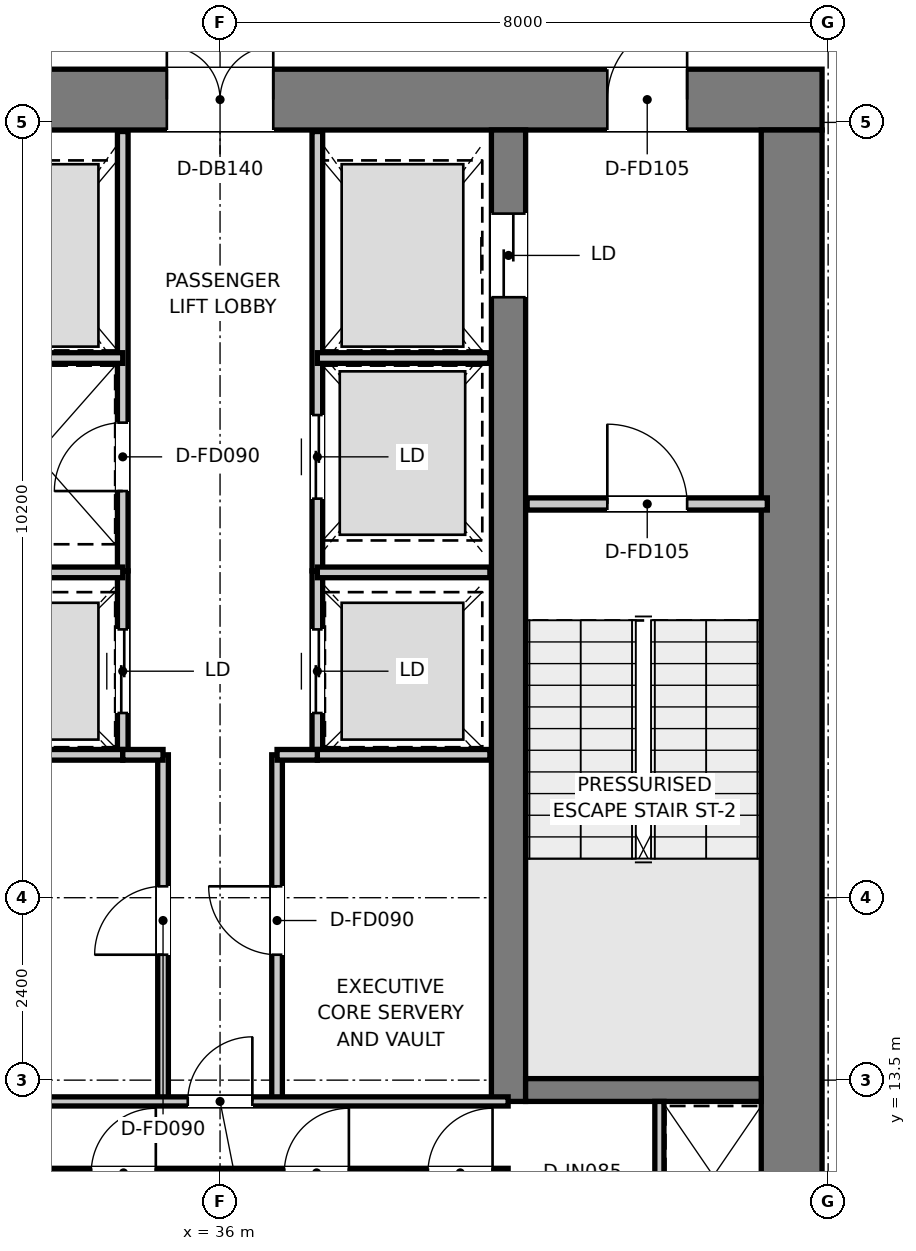
"""IFC4 building model, lengths in metres.
Left out: names, types, materials, properties, quantities, classifications, styles, units other than length and angle.
Written with IfcOpenShell. Run it as: python <this file> out.ifc"""

import sys

from ifc_helpers import new_model, si_unit, direction, frame, frame_2d, origin, place, context, subcontext, project, spatial, rectangle, extrude, element, fill, save


model = new_model("IFC4")
c1 = context("Model", 3, precision=1e-05, world=origin(), true_north=direction((0.0, 1.0)))
c2 = subcontext(c1, "Body", "Model", "MODEL_VIEW")
j1 = project(units=[si_unit("LENGTHUNIT", "METRE"), si_unit("PLANEANGLEUNIT", "RADIAN")], contexts=[c1])
p1 = place(None, origin())
s1 = spatial("IfcSite", under=j1, at=p1, CompositionType="ELEMENT")
p2 = place(p1, origin())
s2 = spatial("IfcBuilding", under=s1, at=p2, CompositionType="ELEMENT")
p3 = place(p2, frame((0.0, 0.0, 314.8)))
s3 = spatial("IfcBuildingStorey", under=s2, at=p3, CompositionType="ELEMENT", Elevation=314.8)
p4 = place(p3, frame((28.08, 26.4, 0.0), z_axis=(0.0, 0.0, 1.0), x_axis=(1.0, 0.0, 0.0)))
e1 = element("IfcWall", 1, at=p4, inside=s3, PredefinedType="SHEAR", context=c2, shape_type="SweptSolid", body=[
    extrude(rectangle(XDim=15.84, YDim=0.8, at=frame_2d((7.92, 0.0))), origin(), (0.0, 0.0, 1.0), 3.95),
])
p5 = place(p4, frame((7.22, 0.0, 0.0)))
e2 = element("IfcOpeningElement", 2, at=p5, cuts=e1, PredefinedType="OPENING", context=c2, shape_type="SweptSolid", body=[
    extrude(rectangle(XDim=1.4, YDim=2.2, at=frame_2d((0.7, 1.1))), frame((0.0, 0.41, 0.0), z_axis=(0.0, -1.0, 0.0), x_axis=(1.0, 0.0, 0.0)), (0.0, 0.0, 1.0), 0.82),
])
p6 = place(p4, frame((1.775, 0.0, 0.0)))
e3 = element("IfcOpeningElement", 3, at=p6, cuts=e1, PredefinedType="OPENING", context=c2, shape_type="SweptSolid", body=[
    extrude(rectangle(XDim=1.05, YDim=2.1, at=frame_2d((0.525, 1.05))), frame((0.0, 0.41, 0.0), z_axis=(0.0, -1.0, 0.0), x_axis=(1.0, 0.0, 0.0)), (0.0, 0.0, 1.0), 0.82),
])
p7 = place(p4, frame((13.015, 0.0, 0.0)))
e4 = element("IfcOpeningElement", 4, at=p7, cuts=e1, PredefinedType="OPENING", context=c2, shape_type="SweptSolid", body=[
    extrude(rectangle(XDim=1.05, YDim=2.1, at=frame_2d((0.525, 1.05))), frame((0.0, 0.41, 0.0), z_axis=(0.0, -1.0, 0.0), x_axis=(1.0, 0.0, 0.0)), (0.0, 0.0, 1.0), 0.82),
])
p8 = place(p3, frame((43.52, 11.3, 0.0), z_axis=(0.0, 0.0, 1.0), x_axis=(0.0, 1.0, 0.0)))
e5 = element("IfcWall", 5, at=p8, inside=s3, PredefinedType="SHEAR", context=c2, shape_type="SweptSolid", body=[
    extrude(rectangle(XDim=14.7, YDim=0.8, at=frame_2d((7.35, 0.0))), origin(), (0.0, 0.0, 1.0), 3.95),
])
p9 = place(p3, frame((39.795, 13.22, 0.0), z_axis=(0.0, 0.0, 1.0), x_axis=(0.0, 1.0, 0.0)))
e6 = element("IfcWall", 6, at=p9, inside=s3, PredefinedType="SHEAR", context=c2, shape_type="SweptSolid", body=[
    extrude(rectangle(XDim=12.78, YDim=0.45, at=frame_2d((6.39, 0.0))), origin(), (0.0, 0.0, 1.0), 3.95),
])
p10 = place(p9, frame((10.58, 0.0, 0.0)))
e7 = element("IfcOpeningElement", 7, at=p10, cuts=e6, PredefinedType="OPENING", context=c2, shape_type="SweptSolid", body=[
    extrude(rectangle(XDim=1.1, YDim=2.15, at=frame_2d((0.55, 1.075))), frame((0.0, 0.235, 0.0), z_axis=(0.0, -1.0, 0.0), x_axis=(1.0, 0.0, 0.0)), (0.0, 0.0, 1.0), 0.47),
])
p11 = place(p3, frame((40.02, 13.37, 0.0), z_axis=(0.0, 0.0, 1.0), x_axis=(1.0, 0.0, 0.0)))
e8 = element("IfcWall", 8, at=p11, inside=s3, PredefinedType="SHEAR", context=c2, shape_type="SweptSolid", body=[
    extrude(rectangle(XDim=3.1, YDim=0.3, at=frame_2d((1.55, 0.0))), origin(), (0.0, 0.0, 1.0), 3.95),
])
p12 = place(p3, frame((40.04, 21.08, 0.0), z_axis=(0.0, 0.0, 1.0), x_axis=(1.0, 0.0, 0.0)))
e9 = element("IfcWall", 9, at=p12, inside=s3, PredefinedType="PARTITIONING", context=c2, shape_type="SweptSolid", body=[
    extrude(rectangle(XDim=3.16, YDim=0.16, at=frame_2d((1.58, 0.0))), origin(), (0.0, 0.0, 1.0), 3.59),
])
p13 = place(p12, frame((1.055, 0.0, 0.0)))
e10 = element("IfcOpeningElement", 10, at=p13, cuts=e9, PredefinedType="OPENING", context=c2, shape_type="SweptSolid", body=[
    extrude(rectangle(XDim=1.05, YDim=2.1, at=frame_2d((0.525, 1.05))), frame((0.0, 0.09, 0.0), z_axis=(0.0, -1.0, 0.0), x_axis=(1.0, 0.0, 0.0)), (0.0, 0.0, 1.0), 0.18),
])
p14 = place(p3, frame((34.72, 20.2, 0.0), z_axis=(0.0, 0.0, 1.0), x_axis=(0.0, 1.0, 0.0)))
e11 = element("IfcWall", 11, at=p14, inside=s3, PredefinedType="PARTITIONING", context=c2, shape_type="SweptSolid", body=[
    extrude(rectangle(XDim=5.78, YDim=0.14, at=frame_2d((2.89, 0.0))), origin(), (0.0, 0.0, 1.0), 2.74),
])
p15 = place(p14, frame((1.05, 0.0, 0.0)))
e12 = element("IfcOpeningElement", 12, at=p15, cuts=e11, PredefinedType="OPENING", context=c2, shape_type="SweptSolid", body=[
    extrude(rectangle(XDim=0.9, YDim=2.1, at=frame_2d((0.45, 1.05))), frame((0.0, 0.08, 0.0), z_axis=(0.0, -1.0, 0.0), x_axis=(1.0, 0.0, 0.0)), (0.0, 0.0, 1.0), 0.16),
])
p16 = place(p3, frame((37.28, 20.2, 0.0), z_axis=(0.0, 0.0, 1.0), x_axis=(0.0, 1.0, 0.0)))
e13 = element("IfcWall", 13, at=p16, inside=s3, PredefinedType="PARTITIONING", context=c2, shape_type="SweptSolid", body=[
    extrude(rectangle(XDim=5.78, YDim=0.14, at=frame_2d((2.89, 0.0))), origin(), (0.0, 0.0, 1.0), 2.74),
])
p17 = place(p16, frame((0.95, 0.0, 0.0)))
e14 = element("IfcOpeningElement", 14, at=p17, cuts=e13, PredefinedType="OPENING", context=c2, shape_type="SweptSolid", body=[
    extrude(rectangle(XDim=1.1, YDim=2.15, at=frame_2d((0.55, 1.075))), frame((0.0, 0.08, 0.0), z_axis=(0.0, -1.0, 0.0), x_axis=(1.0, 0.0, 0.0)), (0.0, 0.0, 1.0), 0.16),
])
for number, where, z_axis, x_axis in (
    (15, (32.45, 23.0, 0.0), (0.0, 0.0, 1.0), (1.0, 0.0, 0.0)),
    (16, (37.28, 23.0, 0.0), (0.0, 0.0, 1.0), (1.0, 0.0, 0.0)),
):
    element("IfcWall", number, at=place(p3, frame(where, z_axis=z_axis, x_axis=x_axis)), inside=s3, PredefinedType="PARTITIONING", context=c2, shape_type="SweptSolid", body=[
        extrude(rectangle(XDim=2.27, YDim=0.14, at=frame_2d((1.135, 0.0))), origin(), (0.0, 0.0, 1.0), 2.74),
    ])
p18 = place(p3, frame((34.72, 17.78, 0.0), z_axis=(0.0, 0.0, 1.0), x_axis=(0.0, 1.0, 0.0)))
e17 = element("IfcWall", 17, at=p18, inside=s3, PredefinedType="PARTITIONING", context=c2, shape_type="SweptSolid", body=[
    extrude(rectangle(XDim=2.42, YDim=0.14, at=frame_2d((1.21, 0.0))), origin(), (0.0, 0.0, 1.0), 3.59),
])
p19 = place(p18, frame((0.55, 0.0, 0.0)))
e18 = element("IfcOpeningElement", 18, at=p19, cuts=e17, PredefinedType="OPENING", context=c2, shape_type="SweptSolid", body=[
    extrude(rectangle(XDim=1.1, YDim=2.15, at=frame_2d((0.55, 1.075))), frame((0.0, 0.08, 0.0), z_axis=(0.0, -1.0, 0.0), x_axis=(1.0, 0.0, 0.0)), (0.0, 0.0, 1.0), 0.16),
])
p20 = place(p3, frame((37.28, 17.78, 0.0), z_axis=(0.0, 0.0, 1.0), x_axis=(0.0, 1.0, 0.0)))
e19 = element("IfcWall", 19, at=p20, inside=s3, PredefinedType="PARTITIONING", context=c2, shape_type="SweptSolid", body=[
    extrude(rectangle(XDim=2.42, YDim=0.14, at=frame_2d((1.21, 0.0))), origin(), (0.0, 0.0, 1.0), 3.59),
])
p21 = place(p20, frame((0.55, 0.0, 0.0)))
e20 = element("IfcOpeningElement", 20, at=p21, cuts=e19, PredefinedType="OPENING", context=c2, shape_type="SweptSolid", body=[
    extrude(rectangle(XDim=1.1, YDim=2.15, at=frame_2d((0.55, 1.075))), frame((0.0, 0.08, 0.0), z_axis=(0.0, -1.0, 0.0), x_axis=(1.0, 0.0, 0.0)), (0.0, 0.0, 1.0), 0.16),
])
for number, where, z_axis, x_axis in (
    (21, (32.45, 17.78, 0.0), (0.0, 0.0, 1.0), (1.0, 0.0, 0.0)),
    (22, (32.45, 20.18, 0.0), (0.0, 0.0, 1.0), (1.0, 0.0, 0.0)),
    (23, (37.28, 17.78, 0.0), (0.0, 0.0, 1.0), (1.0, 0.0, 0.0)),
    (24, (37.28, 20.18, 0.0), (0.0, 0.0, 1.0), (1.0, 0.0, 0.0)),
):
    element("IfcWall", number, at=place(p3, frame(where, z_axis=z_axis, x_axis=x_axis)), inside=s3, PredefinedType="PARTITIONING", context=c2, shape_type="SweptSolid", body=[
        extrude(rectangle(XDim=2.27, YDim=0.14, at=frame_2d((1.135, 0.0))), origin(), (0.0, 0.0, 1.0), 3.59),
    ])
p22 = place(p3, frame((35.25, 13.22, 0.0), z_axis=(0.0, 0.0, 1.0), x_axis=(0.0, 1.0, 0.0)))
e25 = element("IfcWall", 25, at=p22, inside=s3, PredefinedType="PARTITIONING", context=c2, shape_type="SweptSolid", body=[
    extrude(rectangle(XDim=4.56, YDim=0.14, at=frame_2d((2.28, 0.0))), origin(), (0.0, 0.0, 1.0), 3.59),
])
p23 = place(p22, frame((1.93, 0.0, 0.0)))
e26 = element("IfcOpeningElement", 26, at=p23, cuts=e25, PredefinedType="OPENING", context=c2, shape_type="SweptSolid", body=[
    extrude(rectangle(XDim=0.9, YDim=2.1, at=frame_2d((0.45, 1.05))), frame((0.0, 0.08, 0.0), z_axis=(0.0, -1.0, 0.0), x_axis=(1.0, 0.0, 0.0)), (0.0, 0.0, 1.0), 0.16),
])
p24 = place(p3, frame((34.72, 17.78, 0.0), z_axis=(0.0, 0.0, 1.0), x_axis=(1.0, 0.0, 0.0)))
e27 = element("IfcWall", 27, at=p24, inside=s3, PredefinedType="PARTITIONING", context=c2, shape_type="SweptSolid", body=[
    extrude(rectangle(XDim=0.53, YDim=0.14, at=frame_2d((0.265, 0.0))), origin(), (0.0, 0.0, 1.0), 3.59),
])
p25 = place(p3, frame((36.75, 13.22, 0.0), z_axis=(0.0, 0.0, 1.0), x_axis=(0.0, 1.0, 0.0)))
e28 = element("IfcWall", 28, at=p25, inside=s3, PredefinedType="PARTITIONING", context=c2, shape_type="SweptSolid", body=[
    extrude(rectangle(XDim=4.56, YDim=0.14, at=frame_2d((2.28, 0.0))), origin(), (0.0, 0.0, 1.0), 3.59),
])
p26 = place(p25, frame((1.93, 0.0, 0.0)))
e29 = element("IfcOpeningElement", 29, at=p26, cuts=e28, PredefinedType="OPENING", context=c2, shape_type="SweptSolid", body=[
    extrude(rectangle(XDim=0.9, YDim=2.1, at=frame_2d((0.45, 1.05))), frame((0.0, 0.08, 0.0), z_axis=(0.0, -1.0, 0.0), x_axis=(1.0, 0.0, 0.0)), (0.0, 0.0, 1.0), 0.16),
])
p27 = place(p3, frame((36.75, 17.78, 0.0), z_axis=(0.0, 0.0, 1.0), x_axis=(1.0, 0.0, 0.0)))
e30 = element("IfcWall", 30, at=p27, inside=s3, PredefinedType="PARTITIONING", context=c2, shape_type="SweptSolid", body=[
    extrude(rectangle(XDim=0.53, YDim=0.14, at=frame_2d((0.265, 0.0))), origin(), (0.0, 0.0, 1.0), 3.59),
])
p28 = place(p3, frame((41.78, 11.25, 0.0), z_axis=(0.0, 0.0, 1.0), x_axis=(0.0, 1.0, 0.0)))
e31 = element("IfcWall", 31, at=p28, inside=s3, PredefinedType="PARTITIONING", context=c2, shape_type="SweptSolid", body=[
    extrude(rectangle(XDim=1.97, YDim=0.12, at=frame_2d((0.985, 0.0))), origin(), (0.0, 0.0, 1.0), 3.59),
])
p29 = place(p3, frame((32.21, 13.22, 0.0), z_axis=(0.0, 0.0, 1.0), x_axis=(1.0, 0.0, 0.0)))
e32 = element("IfcWall", 32, at=p29, inside=s3, PredefinedType="PARTITIONING", context=c2, shape_type="SweptSolid", body=[
    extrude(rectangle(XDim=7.58, YDim=0.12, at=frame_2d((3.79, 0.0))), origin(), (0.0, 0.0, 1.0), 3.59),
])
p30 = place(p29, frame((3.365, 0.0, 0.0)))
e33 = element("IfcOpeningElement", 33, at=p30, cuts=e32, PredefinedType="OPENING", context=c2, shape_type="SweptSolid", body=[
    extrude(rectangle(XDim=0.85, YDim=2.1, at=frame_2d((0.425, 1.05))), frame((0.0, 0.07, 0.0), z_axis=(0.0, -1.0, 0.0), x_axis=(1.0, 0.0, 0.0)), (0.0, 0.0, 1.0), 0.14),
])
p31 = place(p3, frame((32.21, 12.28, 0.0), z_axis=(0.0, 0.0, 1.0), x_axis=(1.0, 0.0, 0.0)))
e34 = element("IfcWall", 34, at=p31, inside=s3, PredefinedType="PARTITIONING", context=c2, shape_type="SweptSolid", body=[
    extrude(rectangle(XDim=7.58, YDim=0.12, at=frame_2d((3.79, 0.0))), origin(), (0.0, 0.0, 1.0), 3.59),
])
p32 = place(p31, frame((0.205, 0.0, 0.0)))
e35 = element("IfcOpeningElement", 35, at=p32, cuts=e34, PredefinedType="OPENING", context=c2, shape_type="SweptSolid", body=[
    extrude(rectangle(XDim=0.85, YDim=2.1, at=frame_2d((0.425, 1.05))), frame((0.0, 0.07, 0.0), z_axis=(0.0, -1.0, 0.0), x_axis=(1.0, 0.0, 0.0)), (0.0, 0.0, 1.0), 0.14),
])
p33 = place(p31, frame((2.095, 0.0, 0.0)))
e36 = element("IfcOpeningElement", 36, at=p33, cuts=e34, PredefinedType="OPENING", context=c2, shape_type="SweptSolid", body=[
    extrude(rectangle(XDim=0.85, YDim=2.1, at=frame_2d((0.425, 1.05))), frame((0.0, 0.07, 0.0), z_axis=(0.0, -1.0, 0.0), x_axis=(1.0, 0.0, 0.0)), (0.0, 0.0, 1.0), 0.14),
])
p34 = place(p31, frame((4.635, 0.0, 0.0)))
e37 = element("IfcOpeningElement", 37, at=p34, cuts=e34, PredefinedType="OPENING", context=c2, shape_type="SweptSolid", body=[
    extrude(rectangle(XDim=0.85, YDim=2.1, at=frame_2d((0.425, 1.05))), frame((0.0, 0.07, 0.0), z_axis=(0.0, -1.0, 0.0), x_axis=(1.0, 0.0, 0.0)), (0.0, 0.0, 1.0), 0.14),
])
p35 = place(p31, frame((6.525, 0.0, 0.0)))
e38 = element("IfcOpeningElement", 38, at=p35, cuts=e34, PredefinedType="OPENING", context=c2, shape_type="SweptSolid", body=[
    extrude(rectangle(XDim=0.85, YDim=2.1, at=frame_2d((0.425, 1.05))), frame((0.0, 0.07, 0.0), z_axis=(0.0, -1.0, 0.0), x_axis=(1.0, 0.0, 0.0)), (0.0, 0.0, 1.0), 0.14),
])
p36 = place(p13, origin())
e39 = element("IfcDoor", 39, at=p36, inside=s3, OperationType="SINGLE_SWING_LEFT", PredefinedType="DOOR", context=c2, shape_type="SweptSolid", body=[
    extrude(rectangle(XDim=1.05, YDim=2.1, at=frame_2d((0.525, 1.05))), frame((0.0, 0.025, 0.0), z_axis=(0.0, -1.0, 0.0), x_axis=(1.0, 0.0, 0.0)), (0.0, 0.0, 1.0), 0.05),
])
fill(e10, e39)
p37 = place(p5, origin())
e40 = element("IfcDoor", 40, at=p37, inside=s3, OperationType="DOUBLE_DOOR_SINGLE_SWING", PredefinedType="DOOR", context=c2, shape_type="SweptSolid", body=[
    extrude(rectangle(XDim=1.4, YDim=2.2, at=frame_2d((0.7, 1.1))), frame((0.0, 0.025, 0.0), z_axis=(0.0, -1.0, 0.0), x_axis=(1.0, 0.0, 0.0)), (0.0, 0.0, 1.0), 0.05),
])
fill(e2, e40)
p38 = place(p7, origin())
e41 = element("IfcDoor", 41, at=p38, inside=s3, OperationType="SINGLE_SWING_RIGHT", PredefinedType="DOOR", context=c2, shape_type="SweptSolid", body=[
    extrude(rectangle(XDim=1.05, YDim=2.1, at=frame_2d((0.525, 1.05))), frame((0.0, 0.025, 0.0), z_axis=(0.0, -1.0, 0.0), x_axis=(1.0, 0.0, 0.0)), (0.0, 0.0, 1.0), 0.05),
])
fill(e4, e41)
p39 = place(p10, origin())
e42 = element("IfcDoor", 42, at=p39, inside=s3, OperationType="DOUBLE_DOOR_SLIDING", PredefinedType="DOOR", context=c2, shape_type="SweptSolid", body=[
    extrude(rectangle(XDim=1.1, YDim=2.15, at=frame_2d((0.55, 1.075))), frame((0.0, 0.025, 0.0), z_axis=(0.0, -1.0, 0.0), x_axis=(1.0, 0.0, 0.0)), (0.0, 0.0, 1.0), 0.05),
])
fill(e7, e42)
p40 = place(p15, origin())
e43 = element("IfcDoor", 43, at=p40, inside=s3, OperationType="SINGLE_SWING_LEFT", PredefinedType="DOOR", context=c2, shape_type="SweptSolid", body=[
    extrude(rectangle(XDim=0.9, YDim=2.1, at=frame_2d((0.45, 1.05))), frame((0.0, 0.025, 0.0), z_axis=(0.0, -1.0, 0.0), x_axis=(1.0, 0.0, 0.0)), (0.0, 0.0, 1.0), 0.05),
])
fill(e12, e43)
p41 = place(p17, origin())
e44 = element("IfcDoor", 44, at=p41, inside=s3, OperationType="DOUBLE_DOOR_SLIDING", PredefinedType="DOOR", context=c2, shape_type="SweptSolid", body=[
    extrude(rectangle(XDim=1.1, YDim=2.15, at=frame_2d((0.55, 1.075))), frame((0.0, 0.025, 0.0), z_axis=(0.0, -1.0, 0.0), x_axis=(1.0, 0.0, 0.0)), (0.0, 0.0, 1.0), 0.05),
])
fill(e14, e44)
p42 = place(p19, origin())
e45 = element("IfcDoor", 45, at=p42, inside=s3, OperationType="DOUBLE_DOOR_SLIDING", PredefinedType="DOOR", context=c2, shape_type="SweptSolid", body=[
    extrude(rectangle(XDim=1.1, YDim=2.15, at=frame_2d((0.55, 1.075))), frame((0.0, 0.025, 0.0), z_axis=(0.0, -1.0, 0.0), x_axis=(1.0, 0.0, 0.0)), (0.0, 0.0, 1.0), 0.05),
])
fill(e18, e45)
p43 = place(p21, origin())
e46 = element("IfcDoor", 46, at=p43, inside=s3, OperationType="DOUBLE_DOOR_SLIDING", PredefinedType="DOOR", context=c2, shape_type="SweptSolid", body=[
    extrude(rectangle(XDim=1.1, YDim=2.15, at=frame_2d((0.55, 1.075))), frame((0.0, 0.025, 0.0), z_axis=(0.0, -1.0, 0.0), x_axis=(1.0, 0.0, 0.0)), (0.0, 0.0, 1.0), 0.05),
])
fill(e20, e46)
p44 = place(p23, origin())
e47 = element("IfcDoor", 47, at=p44, inside=s3, OperationType="SINGLE_SWING_LEFT", PredefinedType="DOOR", context=c2, shape_type="SweptSolid", body=[
    extrude(rectangle(XDim=0.9, YDim=2.1, at=frame_2d((0.45, 1.05))), frame((0.0, 0.025, 0.0), z_axis=(0.0, -1.0, 0.0), x_axis=(1.0, 0.0, 0.0)), (0.0, 0.0, 1.0), 0.05),
])
fill(e26, e47)
p45 = place(p26, origin())
e48 = element("IfcDoor", 48, at=p45, inside=s3, OperationType="SINGLE_SWING_RIGHT", PredefinedType="DOOR", context=c2, shape_type="SweptSolid", body=[
    extrude(rectangle(XDim=0.9, YDim=2.1, at=frame_2d((0.45, 1.05))), frame((0.0, 0.025, 0.0), z_axis=(0.0, -1.0, 0.0), x_axis=(1.0, 0.0, 0.0)), (0.0, 0.0, 1.0), 0.05),
])
fill(e29, e48)
p46 = place(p30, origin())
e49 = element("IfcDoor", 49, at=p46, inside=s3, OperationType="SINGLE_SWING_RIGHT", PredefinedType="DOOR", context=c2, shape_type="SweptSolid", body=[
    extrude(rectangle(XDim=0.85, YDim=2.1, at=frame_2d((0.425, 1.05))), frame((0.0, 0.025, 0.0), z_axis=(0.0, -1.0, 0.0), x_axis=(1.0, 0.0, 0.0)), (0.0, 0.0, 1.0), 0.05),
])
fill(e33, e49)
p47 = place(p33, origin())
e50 = element("IfcDoor", 50, at=p47, inside=s3, OperationType="SINGLE_SWING_RIGHT", PredefinedType="DOOR", context=c2, shape_type="SweptSolid", body=[
    extrude(rectangle(XDim=0.85, YDim=2.1, at=frame_2d((0.425, 1.05))), frame((0.0, 0.025, 0.0), z_axis=(0.0, -1.0, 0.0), x_axis=(1.0, 0.0, 0.0)), (0.0, 0.0, 1.0), 0.05),
])
fill(e36, e50)
p48 = place(p34, origin())
e51 = element("IfcDoor", 51, at=p48, inside=s3, OperationType="SINGLE_SWING_RIGHT", PredefinedType="DOOR", context=c2, shape_type="SweptSolid", body=[
    extrude(rectangle(XDim=0.85, YDim=2.1, at=frame_2d((0.425, 1.05))), frame((0.0, 0.025, 0.0), z_axis=(0.0, -1.0, 0.0), x_axis=(1.0, 0.0, 0.0)), (0.0, 0.0, 1.0), 0.05),
])
fill(e37, e51)
p49 = place(p35, origin())
e52 = element("IfcDoor", 52, at=p49, inside=s3, OperationType="SINGLE_SWING_RIGHT", PredefinedType="DOOR", context=c2, shape_type="SweptSolid", body=[
    extrude(rectangle(XDim=0.85, YDim=2.1, at=frame_2d((0.425, 1.05))), frame((0.0, 0.025, 0.0), z_axis=(0.0, -1.0, 0.0), x_axis=(1.0, 0.0, 0.0)), (0.0, 0.0, 1.0), 0.05),
])
fill(e38, e52)
save(model, sys.argv[1])
